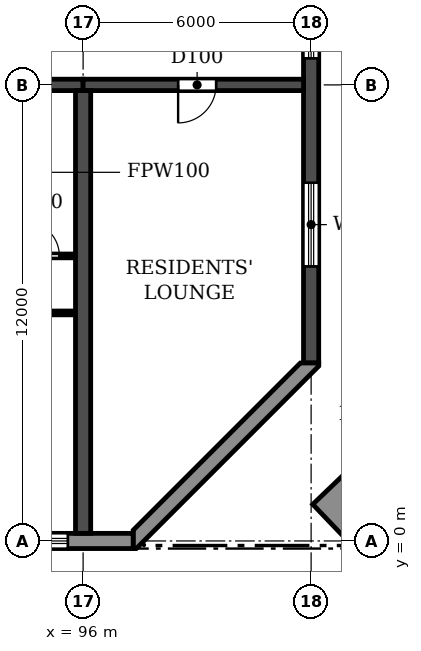
"""IFC4 building model, lengths in metres.
Left out: names, types, materials, properties, quantities, classifications, styles, units other than length and angle.
Written with IfcOpenShell. Run it as: python <this file> out.ifc"""

import sys

from ifc_helpers import new_model, si_unit, direction, frame, frame_2d, origin, place, context, subcontext, project, spatial, polyline, rectangle, outline, extrude, source, transform, mapped, element, fill, save


model = new_model("IFC4")
c1 = context("Model", 3, precision=1e-05, world=origin(), true_north=direction((0.0, 1.0)))
c2 = subcontext(c1, "Body", "Model", "MODEL_VIEW")
j1 = project(units=[si_unit("LENGTHUNIT", "METRE"), si_unit("PLANEANGLEUNIT", "RADIAN")], contexts=[c1])
p1 = place(None, origin())
s1 = spatial("IfcSite", under=j1, at=p1, CompositionType="ELEMENT")
p2 = place(p1, origin())
s2 = spatial("IfcBuilding", under=s1, at=p2, CompositionType="ELEMENT")
p3 = place(p2, frame((0.0, 0.0, 23.4)))
s3 = spatial("IfcBuildingStorey", under=s2, at=p3, CompositionType="ELEMENT", Elevation=23.4)
p4 = place(p3, frame((96.0, 0.2, 0.0), z_axis=(0.0, 0.0, 1.0), x_axis=(0.0, 1.0, 0.0)))
e1 = element("IfcWall", 1, at=p4, inside=s3, PredefinedType="SHEAR", context=c2, shape_type="SweptSolid", body=[
    extrude(rectangle(XDim=11.65, YDim=0.4, at=frame_2d((5.825, 0.0))), origin(), (0.0, 0.0, 1.0), 3.05),
])
p5 = place(p3, frame((102.0, 4.683, 0.0), z_axis=(0.0, 0.0, 1.0), x_axis=(0.0, 1.0, 0.0)))
e2 = element("IfcWall", 2, at=p5, inside=s3, PredefinedType="SHEAR", context=c2, shape_type="SweptSolid", body=[
    extrude(rectangle(XDim=35.434, YDim=0.4, at=frame_2d((17.717, 0.0))), origin(), (0.0, 0.0, 1.0), 3.05),
])
p6 = place(p5, frame((15.917, 0.0, 0.9)))
e3 = element("IfcOpeningElement", 3, at=p6, cuts=e2, PredefinedType="OPENING", context=c2, shape_type="SweptSolid", body=[
    extrude(rectangle(XDim=1.2, YDim=1.5, at=frame_2d((0.6, 0.75))), frame((0.0, 0.21, 0.0), z_axis=(0.0, -1.0, 0.0), x_axis=(1.0, 0.0, 0.0)), (0.0, 0.0, 1.0), 0.42),
])
p7 = place(p5, frame((23.817, 0.0, 0.9)))
e4 = element("IfcOpeningElement", 4, at=p7, cuts=e2, PredefinedType="OPENING", context=c2, shape_type="SweptSolid", body=[
    extrude(rectangle(XDim=1.2, YDim=1.5, at=frame_2d((0.6, 0.75))), frame((0.0, 0.21, 0.0), z_axis=(0.0, -1.0, 0.0), x_axis=(1.0, 0.0, 0.0)), (0.0, 0.0, 1.0), 0.42),
])
p8 = place(p5, frame((8.017, 0.0, 0.9)))
e5 = element("IfcOpeningElement", 5, at=p8, cuts=e2, PredefinedType="OPENING", context=c2, shape_type="SweptSolid", body=[
    extrude(rectangle(XDim=1.2, YDim=1.5, at=frame_2d((0.6, 0.75))), frame((0.0, 0.21, 0.0), z_axis=(0.0, -1.0, 0.0), x_axis=(1.0, 0.0, 0.0)), (0.0, 0.0, 1.0), 0.42),
])
p9 = place(p5, frame((29.493, 0.0, 0.6)))
e6 = element("IfcOpeningElement", 6, at=p9, cuts=e2, PredefinedType="OPENING", context=c2, shape_type="SweptSolid", body=[
    extrude(rectangle(XDim=2.2, YDim=1.8, at=frame_2d((1.1, 0.9))), frame((0.0, 0.21, 0.0), z_axis=(0.0, -1.0, 0.0), x_axis=(1.0, 0.0, 0.0)), (0.0, 0.0, 1.0), 0.42),
])
p10 = place(p5, frame((2.541, 0.0, 0.6)))
e7 = element("IfcOpeningElement", 7, at=p10, cuts=e2, PredefinedType="OPENING", context=c2, shape_type="SweptSolid", body=[
    extrude(rectangle(XDim=2.2, YDim=1.8, at=frame_2d((1.1, 0.9))), frame((0.0, 0.21, 0.0), z_axis=(0.0, -1.0, 0.0), x_axis=(1.0, 0.0, 0.0)), (0.0, 0.0, 1.0), 0.42),
])
p11 = place(p3, frame((90.0, 12.0, 0.0), z_axis=(0.0, 0.0, 1.0), x_axis=(1.0, 0.0, 0.0)))
e8 = element("IfcWall", 8, at=p11, inside=s3, PredefinedType="SHEAR", context=c2, shape_type="SweptSolid", body=[
    extrude(rectangle(XDim=6.0, YDim=0.3, at=frame_2d((3.0, 0.0))), origin(), (0.0, 0.0, 1.0), 2.45),
])
p12 = place(p11, frame((2.45, 0.0, 0.0)))
e9 = element("IfcOpeningElement", 9, at=p12, cuts=e8, PredefinedType="OPENING", context=c2, shape_type="SweptSolid", body=[
    extrude(rectangle(XDim=1.0, YDim=2.1, at=frame_2d((0.5, 1.05))), frame((0.0, 0.16, 0.0), z_axis=(0.0, -1.0, 0.0), x_axis=(1.0, 0.0, 0.0)), (0.0, 0.0, 1.0), 0.32),
])
p13 = place(p3, frame((96.0, 12.0, 0.0), z_axis=(0.0, 0.0, 1.0), x_axis=(1.0, 0.0, 0.0)))
e10 = element("IfcWall", 10, at=p13, inside=s3, PredefinedType="SHEAR", context=c2, shape_type="SweptSolid", body=[
    extrude(rectangle(XDim=5.8, YDim=0.3, at=frame_2d((2.9, 0.0))), origin(), (0.0, 0.0, 1.0), 2.45),
])
p14 = place(p13, frame((2.5, 0.0, 0.0)))
e11 = element("IfcOpeningElement", 11, at=p14, cuts=e10, PredefinedType="OPENING", context=c2, shape_type="SweptSolid", body=[
    extrude(rectangle(XDim=1.0, YDim=2.1, at=frame_2d((0.5, 1.05))), frame((0.0, 0.16, 0.0), z_axis=(0.0, -1.0, 0.0), x_axis=(1.0, 0.0, 0.0)), (0.0, 0.0, 1.0), 0.32),
])
p15 = place(p3, frame((4.683, 0.0, 0.0), z_axis=(0.0, 0.0, 1.0), x_axis=(1.0, 0.0, 0.0)))
e12 = element("IfcWall", 12, at=p15, inside=s3, PredefinedType="STANDARD", context=c2, shape_type="SweptSolid", body=[
    extrude(rectangle(XDim=92.634, YDim=0.4, at=frame_2d((46.317, 0.0))), origin(), (0.0, 0.0, 1.0), 3.05),
])
p16 = place(p15, frame((1.717, 0.0, 0.9)))
e13 = element("IfcOpeningElement", 13, at=p16, cuts=e12, PredefinedType="OPENING", context=c2, shape_type="SweptSolid", body=[
    extrude(rectangle(XDim=2.2, YDim=1.5, at=frame_2d((1.1, 0.75))), frame((0.0, 0.21, 0.0), z_axis=(0.0, -1.0, 0.0), x_axis=(1.0, 0.0, 0.0)), (0.0, 0.0, 1.0), 0.42),
])
p17 = place(p15, frame((4.717, 0.0, 0.9)))
e14 = element("IfcOpeningElement", 14, at=p17, cuts=e12, PredefinedType="OPENING", context=c2, shape_type="SweptSolid", body=[
    extrude(rectangle(XDim=2.2, YDim=1.5, at=frame_2d((1.1, 0.75))), frame((0.0, 0.21, 0.0), z_axis=(0.0, -1.0, 0.0), x_axis=(1.0, 0.0, 0.0)), (0.0, 0.0, 1.0), 0.42),
])
p18 = place(p15, frame((7.717, 0.0, 0.9)))
e15 = element("IfcOpeningElement", 15, at=p18, cuts=e12, PredefinedType="OPENING", context=c2, shape_type="SweptSolid", body=[
    extrude(rectangle(XDim=2.2, YDim=1.5, at=frame_2d((1.1, 0.75))), frame((0.0, 0.21, 0.0), z_axis=(0.0, -1.0, 0.0), x_axis=(1.0, 0.0, 0.0)), (0.0, 0.0, 1.0), 0.42),
])
p19 = place(p15, frame((10.717, 0.0, 0.9)))
e16 = element("IfcOpeningElement", 16, at=p19, cuts=e12, PredefinedType="OPENING", context=c2, shape_type="SweptSolid", body=[
    extrude(rectangle(XDim=2.2, YDim=1.5, at=frame_2d((1.1, 0.75))), frame((0.0, 0.21, 0.0), z_axis=(0.0, -1.0, 0.0), x_axis=(1.0, 0.0, 0.0)), (0.0, 0.0, 1.0), 0.42),
])
p20 = place(p15, frame((13.717, 0.0, 0.9)))
e17 = element("IfcOpeningElement", 17, at=p20, cuts=e12, PredefinedType="OPENING", context=c2, shape_type="SweptSolid", body=[
    extrude(rectangle(XDim=2.2, YDim=1.5, at=frame_2d((1.1, 0.75))), frame((0.0, 0.21, 0.0), z_axis=(0.0, -1.0, 0.0), x_axis=(1.0, 0.0, 0.0)), (0.0, 0.0, 1.0), 0.42),
])
p21 = place(p15, frame((16.717, 0.0, 0.9)))
e18 = element("IfcOpeningElement", 18, at=p21, cuts=e12, PredefinedType="OPENING", context=c2, shape_type="SweptSolid", body=[
    extrude(rectangle(XDim=2.2, YDim=1.5, at=frame_2d((1.1, 0.75))), frame((0.0, 0.21, 0.0), z_axis=(0.0, -1.0, 0.0), x_axis=(1.0, 0.0, 0.0)), (0.0, 0.0, 1.0), 0.42),
])
p22 = place(p15, frame((19.917, 0.0, 0.0)))
e19 = element("IfcOpeningElement", 19, at=p22, cuts=e12, PredefinedType="OPENING", context=c2, shape_type="SweptSolid", body=[
    extrude(rectangle(XDim=1.8, YDim=2.4, at=frame_2d((0.9, 1.2))), frame((0.0, 0.21, 0.0), z_axis=(0.0, -1.0, 0.0), x_axis=(1.0, 0.0, 0.0)), (0.0, 0.0, 1.0), 0.42),
])
p23 = place(p15, frame((22.717, 0.0, 0.9)))
e20 = element("IfcOpeningElement", 20, at=p23, cuts=e12, PredefinedType="OPENING", context=c2, shape_type="SweptSolid", body=[
    extrude(rectangle(XDim=2.2, YDim=1.5, at=frame_2d((1.1, 0.75))), frame((0.0, 0.21, 0.0), z_axis=(0.0, -1.0, 0.0), x_axis=(1.0, 0.0, 0.0)), (0.0, 0.0, 1.0), 0.42),
])
p24 = place(p15, frame((25.717, 0.0, 0.9)))
e21 = element("IfcOpeningElement", 21, at=p24, cuts=e12, PredefinedType="OPENING", context=c2, shape_type="SweptSolid", body=[
    extrude(rectangle(XDim=2.2, YDim=1.5, at=frame_2d((1.1, 0.75))), frame((0.0, 0.21, 0.0), z_axis=(0.0, -1.0, 0.0), x_axis=(1.0, 0.0, 0.0)), (0.0, 0.0, 1.0), 0.42),
])
p25 = place(p15, frame((28.717, 0.0, 0.9)))
e22 = element("IfcOpeningElement", 22, at=p25, cuts=e12, PredefinedType="OPENING", context=c2, shape_type="SweptSolid", body=[
    extrude(rectangle(XDim=2.2, YDim=1.5, at=frame_2d((1.1, 0.75))), frame((0.0, 0.21, 0.0), z_axis=(0.0, -1.0, 0.0), x_axis=(1.0, 0.0, 0.0)), (0.0, 0.0, 1.0), 0.42),
])
p26 = place(p15, frame((31.917, 0.0, 0.0)))
e23 = element("IfcOpeningElement", 23, at=p26, cuts=e12, PredefinedType="OPENING", context=c2, shape_type="SweptSolid", body=[
    extrude(rectangle(XDim=1.8, YDim=2.4, at=frame_2d((0.9, 1.2))), frame((0.0, 0.21, 0.0), z_axis=(0.0, -1.0, 0.0), x_axis=(1.0, 0.0, 0.0)), (0.0, 0.0, 1.0), 0.42),
])
p27 = place(p15, frame((34.717, 0.0, 0.9)))
e24 = element("IfcOpeningElement", 24, at=p27, cuts=e12, PredefinedType="OPENING", context=c2, shape_type="SweptSolid", body=[
    extrude(rectangle(XDim=2.2, YDim=1.5, at=frame_2d((1.1, 0.75))), frame((0.0, 0.21, 0.0), z_axis=(0.0, -1.0, 0.0), x_axis=(1.0, 0.0, 0.0)), (0.0, 0.0, 1.0), 0.42),
])
p28 = place(p15, frame((37.717, 0.0, 0.9)))
e25 = element("IfcOpeningElement", 25, at=p28, cuts=e12, PredefinedType="OPENING", context=c2, shape_type="SweptSolid", body=[
    extrude(rectangle(XDim=2.2, YDim=1.5, at=frame_2d((1.1, 0.75))), frame((0.0, 0.21, 0.0), z_axis=(0.0, -1.0, 0.0), x_axis=(1.0, 0.0, 0.0)), (0.0, 0.0, 1.0), 0.42),
])
p29 = place(p15, frame((40.717, 0.0, 0.9)))
e26 = element("IfcOpeningElement", 26, at=p29, cuts=e12, PredefinedType="OPENING", context=c2, shape_type="SweptSolid", body=[
    extrude(rectangle(XDim=2.2, YDim=1.5, at=frame_2d((1.1, 0.75))), frame((0.0, 0.21, 0.0), z_axis=(0.0, -1.0, 0.0), x_axis=(1.0, 0.0, 0.0)), (0.0, 0.0, 1.0), 0.42),
])
p30 = place(p15, frame((43.917, 0.0, 0.0)))
e27 = element("IfcOpeningElement", 27, at=p30, cuts=e12, PredefinedType="OPENING", context=c2, shape_type="SweptSolid", body=[
    extrude(rectangle(XDim=1.8, YDim=2.4, at=frame_2d((0.9, 1.2))), frame((0.0, 0.21, 0.0), z_axis=(0.0, -1.0, 0.0), x_axis=(1.0, 0.0, 0.0)), (0.0, 0.0, 1.0), 0.42),
])
p31 = place(p15, frame((46.717, 0.0, 0.9)))
e28 = element("IfcOpeningElement", 28, at=p31, cuts=e12, PredefinedType="OPENING", context=c2, shape_type="SweptSolid", body=[
    extrude(rectangle(XDim=2.2, YDim=1.5, at=frame_2d((1.1, 0.75))), frame((0.0, 0.21, 0.0), z_axis=(0.0, -1.0, 0.0), x_axis=(1.0, 0.0, 0.0)), (0.0, 0.0, 1.0), 0.42),
])
p32 = place(p15, frame((49.717, 0.0, 0.9)))
e29 = element("IfcOpeningElement", 29, at=p32, cuts=e12, PredefinedType="OPENING", context=c2, shape_type="SweptSolid", body=[
    extrude(rectangle(XDim=2.2, YDim=1.5, at=frame_2d((1.1, 0.75))), frame((0.0, 0.21, 0.0), z_axis=(0.0, -1.0, 0.0), x_axis=(1.0, 0.0, 0.0)), (0.0, 0.0, 1.0), 0.42),
])
p33 = place(p15, frame((52.717, 0.0, 0.9)))
e30 = element("IfcOpeningElement", 30, at=p33, cuts=e12, PredefinedType="OPENING", context=c2, shape_type="SweptSolid", body=[
    extrude(rectangle(XDim=2.2, YDim=1.5, at=frame_2d((1.1, 0.75))), frame((0.0, 0.21, 0.0), z_axis=(0.0, -1.0, 0.0), x_axis=(1.0, 0.0, 0.0)), (0.0, 0.0, 1.0), 0.42),
])
p34 = place(p15, frame((55.717, 0.0, 0.9)))
e31 = element("IfcOpeningElement", 31, at=p34, cuts=e12, PredefinedType="OPENING", context=c2, shape_type="SweptSolid", body=[
    extrude(rectangle(XDim=2.2, YDim=1.5, at=frame_2d((1.1, 0.75))), frame((0.0, 0.21, 0.0), z_axis=(0.0, -1.0, 0.0), x_axis=(1.0, 0.0, 0.0)), (0.0, 0.0, 1.0), 0.42),
])
p35 = place(p15, frame((58.917, 0.0, 0.0)))
e32 = element("IfcOpeningElement", 32, at=p35, cuts=e12, PredefinedType="OPENING", context=c2, shape_type="SweptSolid", body=[
    extrude(rectangle(XDim=1.8, YDim=2.4, at=frame_2d((0.9, 1.2))), frame((0.0, 0.21, 0.0), z_axis=(0.0, -1.0, 0.0), x_axis=(1.0, 0.0, 0.0)), (0.0, 0.0, 1.0), 0.42),
])
p36 = place(p15, frame((61.717, 0.0, 0.9)))
e33 = element("IfcOpeningElement", 33, at=p36, cuts=e12, PredefinedType="OPENING", context=c2, shape_type="SweptSolid", body=[
    extrude(rectangle(XDim=2.2, YDim=1.5, at=frame_2d((1.1, 0.75))), frame((0.0, 0.21, 0.0), z_axis=(0.0, -1.0, 0.0), x_axis=(1.0, 0.0, 0.0)), (0.0, 0.0, 1.0), 0.42),
])
p37 = place(p15, frame((64.717, 0.0, 0.9)))
e34 = element("IfcOpeningElement", 34, at=p37, cuts=e12, PredefinedType="OPENING", context=c2, shape_type="SweptSolid", body=[
    extrude(rectangle(XDim=2.2, YDim=1.5, at=frame_2d((1.1, 0.75))), frame((0.0, 0.21, 0.0), z_axis=(0.0, -1.0, 0.0), x_axis=(1.0, 0.0, 0.0)), (0.0, 0.0, 1.0), 0.42),
])
p38 = place(p15, frame((67.717, 0.0, 0.9)))
e35 = element("IfcOpeningElement", 35, at=p38, cuts=e12, PredefinedType="OPENING", context=c2, shape_type="SweptSolid", body=[
    extrude(rectangle(XDim=2.2, YDim=1.5, at=frame_2d((1.1, 0.75))), frame((0.0, 0.21, 0.0), z_axis=(0.0, -1.0, 0.0), x_axis=(1.0, 0.0, 0.0)), (0.0, 0.0, 1.0), 0.42),
])
p39 = place(p15, frame((70.917, 0.0, 0.0)))
e36 = element("IfcOpeningElement", 36, at=p39, cuts=e12, PredefinedType="OPENING", context=c2, shape_type="SweptSolid", body=[
    extrude(rectangle(XDim=1.8, YDim=2.4, at=frame_2d((0.9, 1.2))), frame((0.0, 0.21, 0.0), z_axis=(0.0, -1.0, 0.0), x_axis=(1.0, 0.0, 0.0)), (0.0, 0.0, 1.0), 0.42),
])
p40 = place(p15, frame((73.717, 0.0, 0.9)))
e37 = element("IfcOpeningElement", 37, at=p40, cuts=e12, PredefinedType="OPENING", context=c2, shape_type="SweptSolid", body=[
    extrude(rectangle(XDim=2.2, YDim=1.5, at=frame_2d((1.1, 0.75))), frame((0.0, 0.21, 0.0), z_axis=(0.0, -1.0, 0.0), x_axis=(1.0, 0.0, 0.0)), (0.0, 0.0, 1.0), 0.42),
])
p41 = place(p15, frame((76.717, 0.0, 0.9)))
e38 = element("IfcOpeningElement", 38, at=p41, cuts=e12, PredefinedType="OPENING", context=c2, shape_type="SweptSolid", body=[
    extrude(rectangle(XDim=2.2, YDim=1.5, at=frame_2d((1.1, 0.75))), frame((0.0, 0.21, 0.0), z_axis=(0.0, -1.0, 0.0), x_axis=(1.0, 0.0, 0.0)), (0.0, 0.0, 1.0), 0.42),
])
p42 = place(p15, frame((79.717, 0.0, 0.9)))
e39 = element("IfcOpeningElement", 39, at=p42, cuts=e12, PredefinedType="OPENING", context=c2, shape_type="SweptSolid", body=[
    extrude(rectangle(XDim=2.2, YDim=1.5, at=frame_2d((1.1, 0.75))), frame((0.0, 0.21, 0.0), z_axis=(0.0, -1.0, 0.0), x_axis=(1.0, 0.0, 0.0)), (0.0, 0.0, 1.0), 0.42),
])
p43 = place(p15, frame((82.717, 0.0, 0.9)))
e40 = element("IfcOpeningElement", 40, at=p43, cuts=e12, PredefinedType="OPENING", context=c2, shape_type="SweptSolid", body=[
    extrude(rectangle(XDim=2.2, YDim=1.5, at=frame_2d((1.1, 0.75))), frame((0.0, 0.21, 0.0), z_axis=(0.0, -1.0, 0.0), x_axis=(1.0, 0.0, 0.0)), (0.0, 0.0, 1.0), 0.42),
])
p44 = place(p15, frame((85.717, 0.0, 0.9)))
e41 = element("IfcOpeningElement", 41, at=p44, cuts=e12, PredefinedType="OPENING", context=c2, shape_type="SweptSolid", body=[
    extrude(rectangle(XDim=2.2, YDim=1.5, at=frame_2d((1.1, 0.75))), frame((0.0, 0.21, 0.0), z_axis=(0.0, -1.0, 0.0), x_axis=(1.0, 0.0, 0.0)), (0.0, 0.0, 1.0), 0.42),
])
p45 = place(p15, frame((88.717, 0.0, 0.9)))
e42 = element("IfcOpeningElement", 42, at=p45, cuts=e12, PredefinedType="OPENING", context=c2, shape_type="SweptSolid", body=[
    extrude(rectangle(XDim=2.2, YDim=1.5, at=frame_2d((1.1, 0.75))), frame((0.0, 0.21, 0.0), z_axis=(0.0, -1.0, 0.0), x_axis=(1.0, 0.0, 0.0)), (0.0, 0.0, 1.0), 0.42),
])
p46 = place(p3, origin())
e43 = element("IfcWall", 43, at=p46, inside=s3, PredefinedType="STANDARD", context=c2, shape_type="SweptSolid", body=[
    extrude(outline(polyline([(97.317, -0.2), (97.4, -0.2), (102.2, 4.6), (102.2, 4.683), (101.717, 4.683), (97.317, 0.283), (97.317, -0.2)])), origin(), (0.0, 0.0, 1.0), 3.05),
])
m1 = source(origin(), c2, "Body", "SweptSolid", [
    extrude(outline(polyline([(0.0, 0.0), (0.829, -0.867), (2.669, 0.893), (1.84, 1.76), (0.0, 0.0)])), origin(), (0.0, 0.0, 1.0), 0.6),
])
p47 = place(p3, frame((102.043, 0.964, 0.0)))
e44 = element("IfcWall", 44, at=p47, inside=s3, PredefinedType="USERDEFINED", context=c2, shape_type="MappedRepresentation", body=[
    mapped(m1, transform((0.0, 0.0, 0.0))),
])
p48 = place(p3, frame((92.95, 6.0, 0.0), z_axis=(0.0, 0.0, 1.0), x_axis=(1.0, 0.0, 0.0)))
e45 = element("IfcWall", 45, at=p48, inside=s3, PredefinedType="PARTITIONING", context=c2, shape_type="SweptSolid", body=[
    extrude(rectangle(XDim=2.84, YDim=0.1, at=frame_2d((1.42, 0.0))), origin(), (0.0, 0.0, 1.0), 3.05),
])
p49 = place(p48, frame((0.55, 0.0, 0.0)))
e46 = element("IfcOpeningElement", 46, at=p49, cuts=e45, PredefinedType="OPENING", context=c2, shape_type="SweptSolid", body=[
    extrude(rectangle(XDim=0.9, YDim=2.1, at=frame_2d((0.45, 1.05))), frame((0.0, 0.06, 0.0), z_axis=(0.0, -1.0, 0.0), x_axis=(1.0, 0.0, 0.0)), (0.0, 0.0, 1.0), 0.12),
])
p50 = place(p3, frame((93.8, 7.5, 0.0), z_axis=(0.0, 0.0, 1.0), x_axis=(1.0, 0.0, 0.0)))
e47 = element("IfcWall", 47, at=p50, inside=s3, PredefinedType="PARTITIONING", context=c2, shape_type="SweptSolid", body=[
    extrude(rectangle(XDim=1.99, YDim=0.1, at=frame_2d((0.995, 0.0))), origin(), (0.0, 0.0, 1.0), 3.05),
])
p51 = place(p50, frame((0.675, 0.0, 0.0)))
e48 = element("IfcOpeningElement", 48, at=p51, cuts=e47, PredefinedType="OPENING", context=c2, shape_type="SweptSolid", body=[
    extrude(rectangle(XDim=0.9, YDim=2.1, at=frame_2d((0.45, 1.05))), frame((0.0, 0.06, 0.0), z_axis=(0.0, -1.0, 0.0), x_axis=(1.0, 0.0, 0.0)), (0.0, 0.0, 1.0), 0.12),
])
p52 = place(p45, origin())
e49 = element("IfcWindow", 49, at=p52, inside=s3, PartitioningType="DOUBLE_PANEL_HORIZONTAL", PredefinedType="WINDOW", context=c2, shape_type="SweptSolid", body=[
    extrude(rectangle(XDim=2.2, YDim=1.5, at=frame_2d((1.1, 0.75))), frame((0.0, 0.03, 0.0), z_axis=(0.0, -1.0, 0.0), x_axis=(1.0, 0.0, 0.0)), (0.0, 0.0, 1.0), 0.06),
])
fill(e42, e49)
p53 = place(p8, origin())
e50 = element("IfcWindow", 50, at=p53, inside=s3, PartitioningType="SINGLE_PANEL", PredefinedType="WINDOW", context=c2, shape_type="SweptSolid", body=[
    extrude(rectangle(XDim=1.2, YDim=1.5, at=frame_2d((0.6, 0.75))), frame((0.0, 0.03, 0.0), z_axis=(0.0, -1.0, 0.0), x_axis=(1.0, 0.0, 0.0)), (0.0, 0.0, 1.0), 0.06),
])
fill(e5, e50)
p54 = place(p10, origin())
e51 = element("IfcWindow", 51, at=p54, inside=s3, PartitioningType="DOUBLE_PANEL_HORIZONTAL", PredefinedType="WINDOW", context=c2, shape_type="SweptSolid", body=[
    extrude(rectangle(XDim=2.2, YDim=1.8, at=frame_2d((1.1, 0.9))), frame((0.0, 0.03, 0.0), z_axis=(0.0, -1.0, 0.0), x_axis=(1.0, 0.0, 0.0)), (0.0, 0.0, 1.0), 0.06),
])
fill(e7, e51)
p55 = place(p51, origin())
e52 = element("IfcDoor", 52, at=p55, inside=s3, OperationType="SINGLE_SWING_LEFT", PredefinedType="DOOR", context=c2, shape_type="SweptSolid", body=[
    extrude(rectangle(XDim=0.9, YDim=2.1, at=frame_2d((0.45, 1.05))), frame((0.0, 0.025, 0.0), z_axis=(0.0, -1.0, 0.0), x_axis=(1.0, 0.0, 0.0)), (0.0, 0.0, 1.0), 0.05),
])
fill(e48, e52)
p56 = place(p14, frame((1.0, 0.0, 0.0), z_axis=(0.0, 0.0, 1.0), x_axis=(-1.0, 0.0, 0.0)))
e53 = element("IfcDoor", 53, at=p56, inside=s3, OperationType="SINGLE_SWING_RIGHT", PredefinedType="DOOR", context=c2, shape_type="SweptSolid", body=[
    extrude(rectangle(XDim=1.0, YDim=2.1, at=frame_2d((0.5, 1.05))), frame((0.0, 0.025, 0.0), z_axis=(0.0, -1.0, 0.0), x_axis=(1.0, 0.0, 0.0)), (0.0, 0.0, 1.0), 0.05),
])
fill(e11, e53)
save(model, sys.argv[1])
